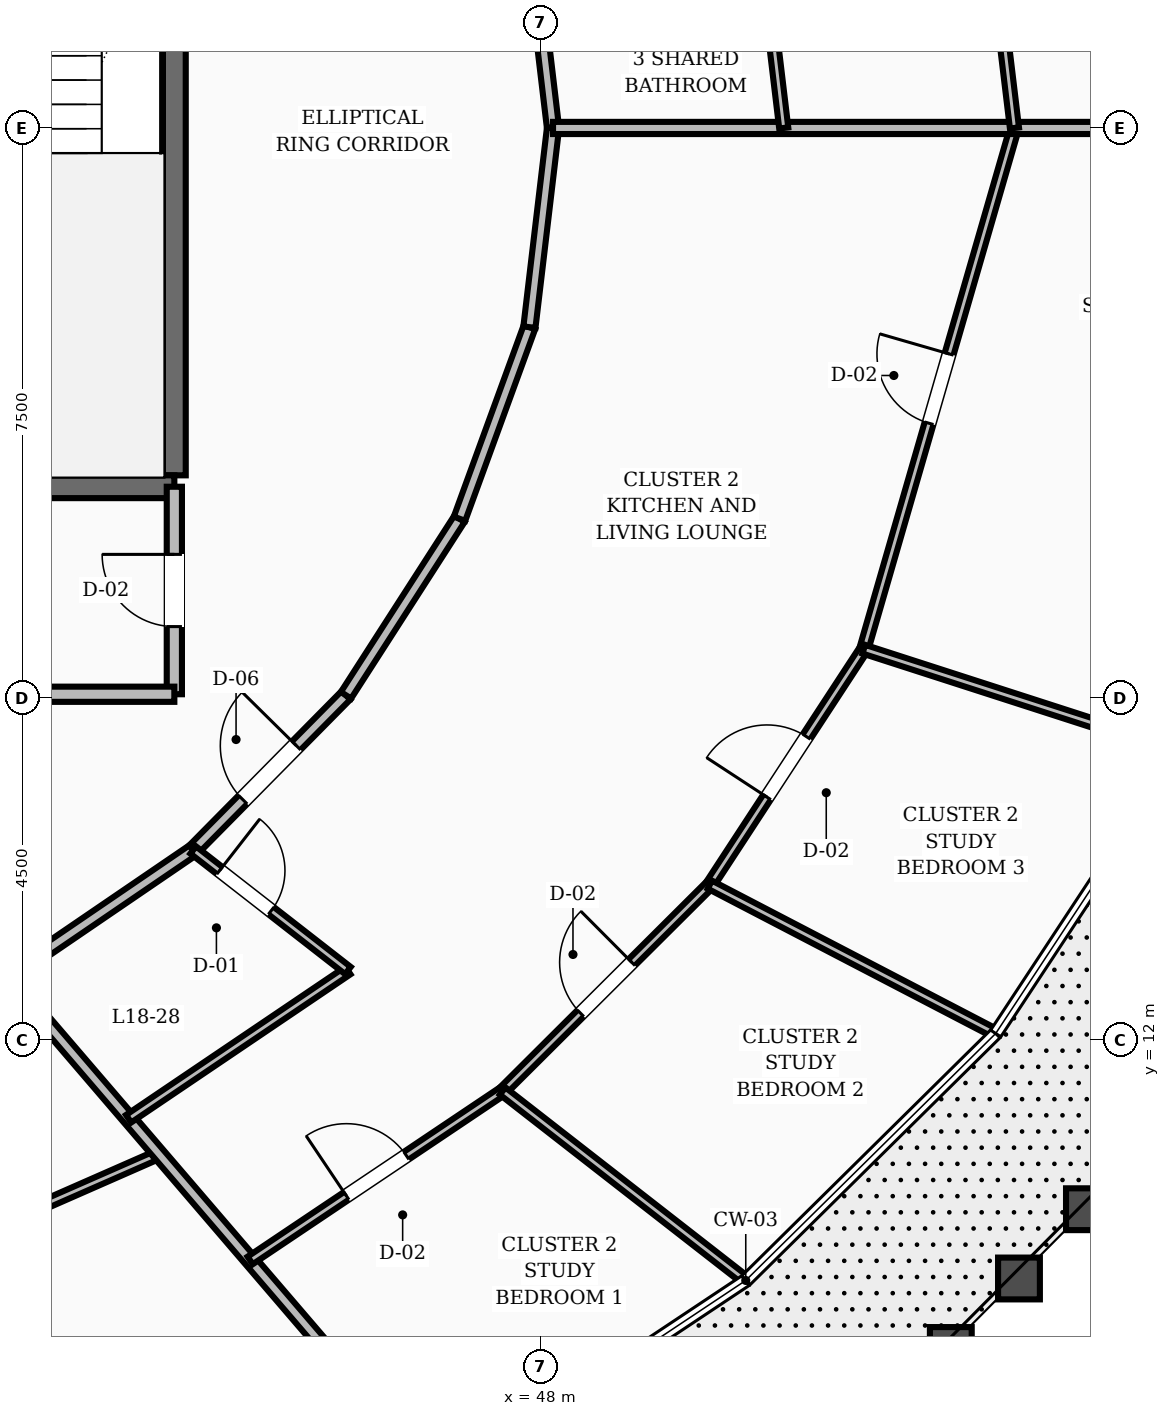
"""IFC4 building model, lengths in metres.
Left out: names, types, materials, properties, quantities, classifications, styles, units other than length and angle.
Written with IfcOpenShell. Run it as: python <this file> out.ifc"""

import sys

from ifc_helpers import new_model, si_unit, direction, frame, frame_2d, origin, place, context, subcontext, project, spatial, rectangle, extrude, element, fill, save


model = new_model("IFC4")
c1 = context("Model", 3, precision=1e-05, world=origin(), true_north=direction((0.0, 1.0)))
c2 = subcontext(c1, "Body", "Model", "MODEL_VIEW")
j1 = project(units=[si_unit("LENGTHUNIT", "METRE"), si_unit("PLANEANGLEUNIT", "RADIAN")], contexts=[c1])
p1 = place(None, origin())
s1 = spatial("IfcSite", under=j1, at=p1, CompositionType="ELEMENT")
p2 = place(p1, origin())
s2 = spatial("IfcBuilding", under=s1, at=p2, CompositionType="ELEMENT")
p3 = place(p2, frame((0.0, 0.0, 73.6)))
s3 = spatial("IfcBuildingStorey", under=s2, at=p3, CompositionType="ELEMENT", Elevation=73.6)
p4 = place(p3, frame((43.18, 19.43, 0.0), z_axis=(0.0, 0.0, 1.0), x_axis=(0.0, 1.0, 0.0)))
e1 = element("IfcWall", 1, at=p4, inside=s3, PredefinedType="SHEAR", context=c2, shape_type="SweptSolid", body=[
    extrude(rectangle(XDim=8.74, YDim=0.3, at=frame_2d((4.37, 0.0))), origin(), (0.0, 0.0, 1.0), 3.6),
])
p5 = place(p3, frame((39.58, 19.28, 0.0), z_axis=(0.0, 0.0, 1.0), x_axis=(1.0, 0.0, 0.0)))
e2 = element("IfcWall", 2, at=p5, inside=s3, PredefinedType="SHEAR", context=c2, shape_type="SweptSolid", body=[
    extrude(rectangle(XDim=3.6, YDim=0.3, at=frame_2d((1.8, 0.0))), origin(), (0.0, 0.0, 1.0), 3.6),
])
p6 = place(p3, frame((43.18, 16.55, 0.0), z_axis=(0.0, 0.0, 1.0), x_axis=(0.0, 1.0, 0.0)))
e3 = element("IfcWall", 3, at=p6, inside=s3, PredefinedType="SOLIDWALL", context=c2, shape_type="SweptSolid", body=[
    extrude(rectangle(XDim=2.73, YDim=0.2, at=frame_2d((1.365, 0.0))), origin(), (0.0, 0.0, 1.0), 2.71),
])
p7 = place(p6, frame((0.89, 0.0, 0.0)))
e4 = element("IfcOpeningElement", 4, at=p7, cuts=e3, PredefinedType="OPENING", context=c2, shape_type="SweptSolid", body=[
    extrude(rectangle(XDim=0.95, YDim=2.1, at=frame_2d((0.475, 1.05))), frame((0.0, 0.11, 0.0), z_axis=(0.0, -1.0, 0.0), x_axis=(1.0, 0.0, 0.0)), (0.0, 0.0, 1.0), 0.22),
])
p8 = place(p3, frame((39.2, 16.55, 0.0), z_axis=(0.0, 0.0, 1.0), x_axis=(1.0, 0.0, 0.0)))
e5 = element("IfcWall", 5, at=p8, inside=s3, PredefinedType="SOLIDWALL", context=c2, shape_type="SweptSolid", body=[
    extrude(rectangle(XDim=3.98, YDim=0.2, at=frame_2d((1.99, 0.0))), origin(), (0.0, 0.0, 1.0), 2.71),
])
p9 = place(p3, frame((48.162, 24.0, 0.0), z_axis=(0.0, 0.0, 1.0), x_axis=(-0.117667763342, 0.993053018459, 0.0)))
e6 = element("IfcWall", 6, at=p9, inside=s3, PredefinedType="SOLIDWALL", context=c2, shape_type="SweptSolid", body=[
    extrude(rectangle(XDim=2.639, YDim=0.16, at=frame_2d((1.32, 0.0))), origin(), (0.0, 0.0, 1.0), 2.71),
])
p10 = place(p3, frame((40.979, 12.83, 0.0), z_axis=(0.0, 0.0, 1.0), x_axis=(0.826112340767, 0.563505457323, 0.0)))
e7 = element("IfcWall", 7, at=p10, inside=s3, PredefinedType="SOLIDWALL", context=c2, shape_type="SweptSolid", body=[
    extrude(rectangle(XDim=2.965, YDim=0.16, at=frame_2d((1.482, 0.0))), origin(), (0.0, 0.0, 1.0), 2.71),
])
p11 = place(p3, frame((43.428, 14.501, 0.0), z_axis=(0.0, 0.0, 1.0), x_axis=(0.702569520063, 0.711615113301, 0.0)))
e8 = element("IfcWall", 8, at=p11, inside=s3, PredefinedType="SOLIDWALL", context=c2, shape_type="SweptSolid", body=[
    extrude(rectangle(XDim=2.861, YDim=0.16, at=frame_2d((1.43, 0.0))), origin(), (0.0, 0.0, 1.0), 2.71),
])
p12 = place(p11, frame((0.93, 0.0, 0.0)))
e9 = element("IfcOpeningElement", 9, at=p12, cuts=e8, PredefinedType="OPENING", context=c2, shape_type="SweptSolid", body=[
    extrude(rectangle(XDim=1.0, YDim=2.1, at=frame_2d((0.5, 1.05))), frame((0.0, 0.09, 0.0), z_axis=(0.0, -1.0, 0.0), x_axis=(1.0, 0.0, 0.0)), (0.0, 0.0, 1.0), 0.18),
])
p13 = place(p3, frame((45.438, 16.537, 0.0), z_axis=(0.0, 0.0, 1.0), x_axis=(0.540891657444, 0.841092274907, 0.0)))
e10 = element("IfcWall", 10, at=p13, inside=s3, PredefinedType="SOLIDWALL", context=c2, shape_type="SweptSolid", body=[
    extrude(rectangle(XDim=2.761, YDim=0.16, at=frame_2d((1.38, 0.0))), origin(), (0.0, 0.0, 1.0), 2.71),
])
p14 = place(p3, frame((46.932, 18.859, 0.0), z_axis=(0.0, 0.0, 1.0), x_axis=(0.342882618672, 0.939378257047, 0.0)))
e11 = element("IfcWall", 11, at=p14, inside=s3, PredefinedType="SOLIDWALL", context=c2, shape_type="SweptSolid", body=[
    extrude(rectangle(XDim=2.683, YDim=0.16, at=frame_2d((1.341, 0.0))), origin(), (0.0, 0.0, 1.0), 2.71),
])
p15 = place(p3, frame((47.852, 21.379, 0.0), z_axis=(0.0, 0.0, 1.0), x_axis=(0.117667763342, 0.993053018459, 0.0)))
e12 = element("IfcWall", 12, at=p15, inside=s3, PredefinedType="SOLIDWALL", context=c2, shape_type="SweptSolid", body=[
    extrude(rectangle(XDim=2.639, YDim=0.16, at=frame_2d((1.32, 0.0))), origin(), (0.0, 0.0, 1.0), 2.71),
])
p16 = place(p3, frame((39.562, 8.999, 0.0), z_axis=(0.0, 0.0, 1.0), x_axis=(0.915567645544, 0.402164004397, 0.0)))
e13 = element("IfcWall", 13, at=p16, inside=s3, PredefinedType="PARTITIONING", context=c2, shape_type="SweptSolid", body=[
    extrude(rectangle(XDim=3.731, YDim=0.12, at=frame_2d((1.865, 0.0))), origin(), (0.0, 0.0, 1.0), 2.71),
])
p17 = place(p3, frame((40.979, 12.83, 0.0), z_axis=(0.0, 0.0, 1.0), x_axis=(0.651051797371, -0.759033304368, 0.0)))
e14 = element("IfcWall", 14, at=p17, inside=s3, PredefinedType="SOLIDWALL", context=c2, shape_type="SweptSolid", body=[
    extrude(rectangle(XDim=8.723, YDim=0.16, at=frame_2d((4.361, 0.0))), origin(), (0.0, 0.0, 1.0), 2.71),
])
p18 = place(p3, frame((42.578, 10.966, 0.0), z_axis=(0.0, 0.0, 1.0), x_axis=(0.828593363903, 0.55985090631, 0.0)))
e15 = element("IfcWall", 15, at=p18, inside=s3, PredefinedType="PARTITIONING", context=c2, shape_type="SweptSolid", body=[
    extrude(rectangle(XDim=3.482, YDim=0.12, at=frame_2d((1.741, 0.0))), origin(), (0.0, 0.0, 1.0), 2.71),
])
p19 = place(p3, frame((43.428, 14.501, 0.0), z_axis=(0.0, 0.0, 1.0), x_axis=(0.788862844391, -0.61456929043, 0.0)))
e16 = element("IfcWall", 16, at=p19, inside=s3, PredefinedType="PARTITIONING", context=c2, shape_type="SweptSolid", body=[
    extrude(rectangle(XDim=2.58, YDim=0.12, at=frame_2d((1.29, 0.0))), origin(), (0.0, 0.0, 1.0), 2.71),
])
p20 = place(p19, frame((0.44, 0.0, 0.0)))
e17 = element("IfcOpeningElement", 17, at=p20, cuts=e16, PredefinedType="OPENING", context=c2, shape_type="SweptSolid", body=[
    extrude(rectangle(XDim=0.86, YDim=2.1, at=frame_2d((0.43, 1.05))), frame((0.0, 0.07, 0.0), z_axis=(0.0, -1.0, 0.0), x_axis=(1.0, 0.0, 0.0)), (0.0, 0.0, 1.0), 0.14),
])
p21 = place(p3, frame((44.177, 9.101, 0.0), z_axis=(0.0, 0.0, 1.0), x_axis=(0.830412762524, 0.557148673011, 0.0)))
e18 = element("IfcWall", 18, at=p21, inside=s3, PredefinedType="PARTITIONING", context=c2, shape_type="SweptSolid", body=[
    extrude(rectangle(XDim=4.0, YDim=0.12, at=frame_2d((2.0, 0.0))), origin(), (0.0, 0.0, 1.0), 2.71),
])
p22 = place(p21, frame((1.525, 0.0, 0.0)))
e19 = element("IfcOpeningElement", 19, at=p22, cuts=e18, PredefinedType="OPENING", context=c2, shape_type="SweptSolid", body=[
    extrude(rectangle(XDim=0.95, YDim=2.1, at=frame_2d((0.475, 1.05))), frame((0.0, 0.07, 0.0), z_axis=(0.0, -1.0, 0.0), x_axis=(1.0, 0.0, 0.0)), (0.0, 0.0, 1.0), 0.14),
])
p23 = place(p3, frame((47.499, 11.33, 0.0), z_axis=(0.0, 0.0, 1.0), x_axis=(0.708501340015, 0.705709466563, 0.0)))
e20 = element("IfcWall", 20, at=p23, inside=s3, PredefinedType="PARTITIONING", context=c2, shape_type="SweptSolid", body=[
    extrude(rectangle(XDim=3.848, YDim=0.12, at=frame_2d((1.924, 0.0))), origin(), (0.0, 0.0, 1.0), 2.71),
])
p24 = place(p23, frame((1.449, 0.0, 0.0)))
e21 = element("IfcOpeningElement", 21, at=p24, cuts=e20, PredefinedType="OPENING", context=c2, shape_type="SweptSolid", body=[
    extrude(rectangle(XDim=0.95, YDim=2.1, at=frame_2d((0.475, 1.05))), frame((0.0, 0.07, 0.0), z_axis=(0.0, -1.0, 0.0), x_axis=(1.0, 0.0, 0.0)), (0.0, 0.0, 1.0), 0.14),
])
p25 = place(p3, frame((47.499, 11.33, 0.0), z_axis=(0.0, 0.0, 1.0), x_axis=(0.788892410808, -0.614531337012, 0.0)))
e22 = element("IfcWall", 22, at=p25, inside=s3, PredefinedType="PARTITIONING", context=c2, shape_type="SweptSolid", body=[
    extrude(rectangle(XDim=4.005, YDim=0.12, at=frame_2d((2.002, 0.0))), origin(), (0.0, 0.0, 1.0), 2.71),
])
p26 = place(p3, frame((50.225, 14.045, 0.0), z_axis=(0.0, 0.0, 1.0), x_axis=(0.547219150068, 0.836989367793, 0.0)))
e23 = element("IfcWall", 23, at=p26, inside=s3, PredefinedType="PARTITIONING", context=c2, shape_type="SweptSolid", body=[
    extrude(rectangle(XDim=3.701, YDim=0.12, at=frame_2d((1.851, 0.0))), origin(), (0.0, 0.0, 1.0), 2.71),
])
p27 = place(p26, frame((1.375, 0.0, 0.0)))
e24 = element("IfcOpeningElement", 24, at=p27, cuts=e23, PredefinedType="OPENING", context=c2, shape_type="SweptSolid", body=[
    extrude(rectangle(XDim=0.95, YDim=2.1, at=frame_2d((0.475, 1.05))), frame((0.0, 0.07, 0.0), z_axis=(0.0, -1.0, 0.0), x_axis=(1.0, 0.0, 0.0)), (0.0, 0.0, 1.0), 0.14),
])
p28 = place(p3, frame((50.225, 14.045, 0.0), z_axis=(0.0, 0.0, 1.0), x_axis=(0.88702496615, -0.461721463034, 0.0)))
e25 = element("IfcWall", 25, at=p28, inside=s3, PredefinedType="PARTITIONING", context=c2, shape_type="SweptSolid", body=[
    extrude(rectangle(XDim=4.19, YDim=0.12, at=frame_2d((2.095, 0.0))), origin(), (0.0, 0.0, 1.0), 2.71),
])
p29 = place(p3, frame((52.25, 17.143, 0.0), z_axis=(0.0, 0.0, 1.0), x_axis=(0.277696791091, 0.960668773417, 0.0)))
e26 = element("IfcWall", 26, at=p29, inside=s3, PredefinedType="PARTITIONING", context=c2, shape_type="SweptSolid", body=[
    extrude(rectangle(XDim=7.138, YDim=0.12, at=frame_2d((3.569, 0.0))), origin(), (0.0, 0.0, 1.0), 2.71),
])
p30 = place(p29, frame((3.094, 0.0, 0.0)))
e27 = element("IfcOpeningElement", 27, at=p30, cuts=e26, PredefinedType="OPENING", context=c2, shape_type="SweptSolid", body=[
    extrude(rectangle(XDim=0.95, YDim=2.1, at=frame_2d((0.475, 1.05))), frame((0.0, 0.07, 0.0), z_axis=(0.0, -1.0, 0.0), x_axis=(1.0, 0.0, 0.0)), (0.0, 0.0, 1.0), 0.14),
])
p31 = place(p3, frame((52.25, 17.143, 0.0), z_axis=(0.0, 0.0, 1.0), x_axis=(0.951692715454, -0.307052072704, 0.0)))
e28 = element("IfcWall", 28, at=p31, inside=s3, PredefinedType="PARTITIONING", context=c2, shape_type="SweptSolid", body=[
    extrude(rectangle(XDim=4.341, YDim=0.12, at=frame_2d((2.171, 0.0))), origin(), (0.0, 0.0, 1.0), 2.71),
])
p32 = place(p3, frame((48.162, 24.0, 0.0), z_axis=(0.0, 0.0, 1.0), x_axis=(1.0, 0.0, 0.0)))
e29 = element("IfcWall", 29, at=p32, inside=s3, PredefinedType="SOLIDWALL", context=c2, shape_type="SweptSolid", body=[
    extrude(rectangle(XDim=10.79, YDim=0.16, at=frame_2d((5.395, 0.0))), origin(), (0.0, 0.0, 1.0), 2.71),
])
p33 = place(p3, frame((51.197, 24.0, 0.0), z_axis=(0.0, 0.0, 1.0), x_axis=(-0.118507685269, 0.992953135114, 0.0)))
e30 = element("IfcWall", 30, at=p33, inside=s3, PredefinedType="PARTITIONING", context=c2, shape_type="SweptSolid", body=[
    extrude(rectangle(XDim=3.111, YDim=0.12, at=frame_2d((1.555, 0.0))), origin(), (0.0, 0.0, 1.0), 2.71),
])
p34 = place(p3, frame((54.233, 24.0, 0.0), z_axis=(0.0, 0.0, 1.0), x_axis=(-0.11926077216, 0.992862965481, 0.0)))
e31 = element("IfcWall", 31, at=p34, inside=s3, PredefinedType="PARTITIONING", context=c2, shape_type="SweptSolid", body=[
    extrude(rectangle(XDim=3.583, YDim=0.12, at=frame_2d((1.791, 0.0))), origin(), (0.0, 0.0, 1.0), 2.71),
])
p35 = place(p34, frame((1.316, 0.0, 0.0)))
e32 = element("IfcOpeningElement", 32, at=p35, cuts=e31, PredefinedType="OPENING", context=c2, shape_type="SweptSolid", body=[
    extrude(rectangle(XDim=0.95, YDim=2.1, at=frame_2d((0.475, 1.05))), frame((0.0, 0.07, 0.0), z_axis=(0.0, -1.0, 0.0), x_axis=(1.0, 0.0, 0.0)), (0.0, 0.0, 1.0), 0.14),
])
p36 = place(p7, origin())
e33 = element("IfcDoor", 33, at=p36, inside=s3, OperationType="SINGLE_SWING_RIGHT", PredefinedType="DOOR", context=c2, shape_type="SweptSolid", body=[
    extrude(rectangle(XDim=0.95, YDim=2.1, at=frame_2d((0.475, 1.05))), frame((0.0, 0.025, 0.0), z_axis=(0.0, -1.0, 0.0), x_axis=(1.0, 0.0, 0.0)), (0.0, 0.0, 1.0), 0.05),
])
fill(e4, e33)
p37 = place(p20, origin())
e34 = element("IfcDoor", 34, at=p37, inside=s3, OperationType="SINGLE_SWING_LEFT", PredefinedType="DOOR", context=c2, shape_type="SweptSolid", body=[
    extrude(rectangle(XDim=0.86, YDim=2.1, at=frame_2d((0.43, 1.05))), frame((0.0, 0.025, 0.0), z_axis=(0.0, -1.0, 0.0), x_axis=(1.0, 0.0, 0.0)), (0.0, 0.0, 1.0), 0.05),
])
fill(e17, e34)
p38 = place(p12, origin())
e35 = element("IfcDoor", 35, at=p38, inside=s3, OperationType="SINGLE_SWING_RIGHT", PredefinedType="DOOR", context=c2, shape_type="SweptSolid", body=[
    extrude(rectangle(XDim=1.0, YDim=2.1, at=frame_2d((0.5, 1.05))), frame((0.0, 0.025, 0.0), z_axis=(0.0, -1.0, 0.0), x_axis=(1.0, 0.0, 0.0)), (0.0, 0.0, 1.0), 0.05),
])
fill(e9, e35)
p39 = place(p22, origin())
e36 = element("IfcDoor", 36, at=p39, inside=s3, OperationType="SINGLE_SWING_LEFT", PredefinedType="DOOR", context=c2, shape_type="SweptSolid", body=[
    extrude(rectangle(XDim=0.95, YDim=2.1, at=frame_2d((0.475, 1.05))), frame((0.0, 0.025, 0.0), z_axis=(0.0, -1.0, 0.0), x_axis=(1.0, 0.0, 0.0)), (0.0, 0.0, 1.0), 0.05),
])
fill(e19, e36)
p40 = place(p24, origin())
e37 = element("IfcDoor", 37, at=p40, inside=s3, OperationType="SINGLE_SWING_RIGHT", PredefinedType="DOOR", context=c2, shape_type="SweptSolid", body=[
    extrude(rectangle(XDim=0.95, YDim=2.1, at=frame_2d((0.475, 1.05))), frame((0.0, 0.025, 0.0), z_axis=(0.0, -1.0, 0.0), x_axis=(1.0, 0.0, 0.0)), (0.0, 0.0, 1.0), 0.05),
])
fill(e21, e37)
p41 = place(p27, origin())
e38 = element("IfcDoor", 38, at=p41, inside=s3, OperationType="SINGLE_SWING_LEFT", PredefinedType="DOOR", context=c2, shape_type="SweptSolid", body=[
    extrude(rectangle(XDim=0.95, YDim=2.1, at=frame_2d((0.475, 1.05))), frame((0.0, 0.025, 0.0), z_axis=(0.0, -1.0, 0.0), x_axis=(1.0, 0.0, 0.0)), (0.0, 0.0, 1.0), 0.05),
])
fill(e24, e38)
p42 = place(p30, origin())
e39 = element("IfcDoor", 39, at=p42, inside=s3, OperationType="SINGLE_SWING_RIGHT", PredefinedType="DOOR", context=c2, shape_type="SweptSolid", body=[
    extrude(rectangle(XDim=0.95, YDim=2.1, at=frame_2d((0.475, 1.05))), frame((0.0, 0.025, 0.0), z_axis=(0.0, -1.0, 0.0), x_axis=(1.0, 0.0, 0.0)), (0.0, 0.0, 1.0), 0.05),
])
fill(e27, e39)
save(model, sys.argv[1])
